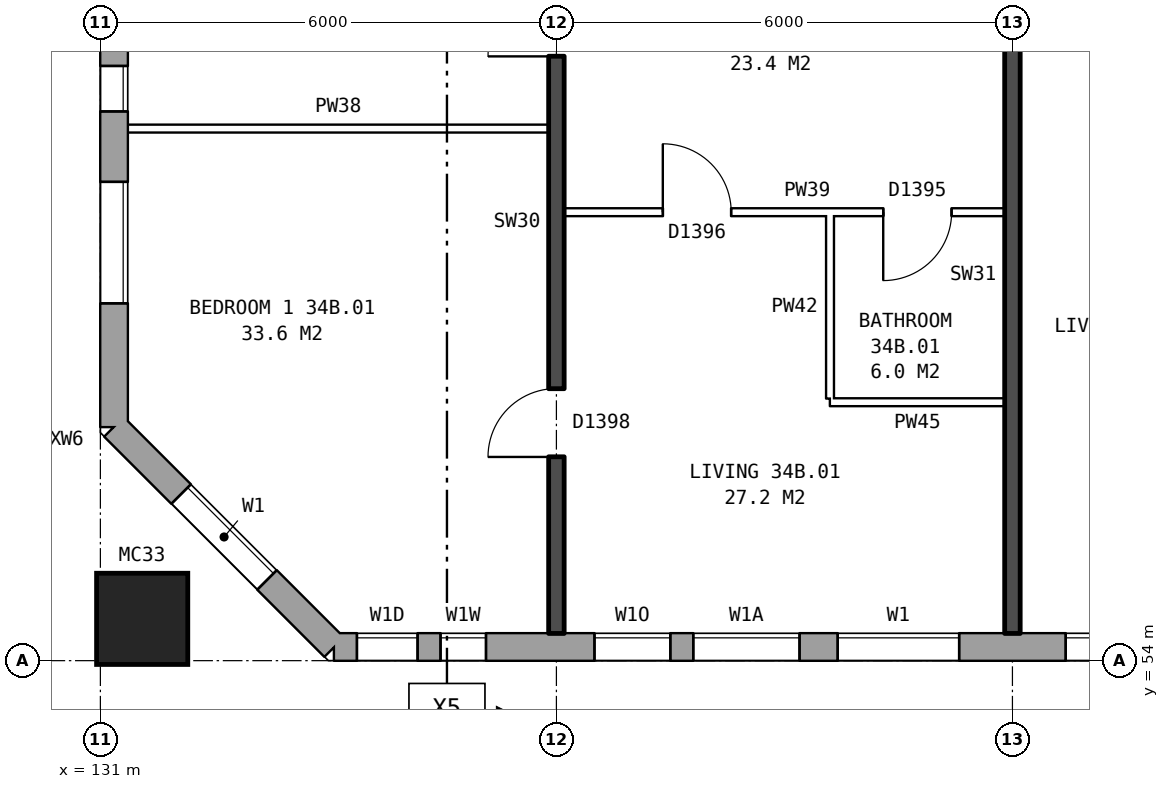
"""IFC4 building model, lengths in metres.
Left out: names, types, materials, properties, quantities, classifications, styles, units other than length and angle.
Written with IfcOpenShell. Run it as: python <this file> out.ifc"""

import sys

from ifc_helpers import new_model, si_unit, direction, frame, frame_2d, origin, origin_2d, place, context, subcontext, project, spatial, rectangle, hollow_rectangle, extrude, element, fill, save


model = new_model("IFC4")
c1 = context("Model", 3, precision=1e-05, world=origin(), true_north=direction((0.0, 1.0)))
c2 = subcontext(c1, "Body", "Model", "MODEL_VIEW")
j1 = project(units=[si_unit("LENGTHUNIT", "METRE"), si_unit("PLANEANGLEUNIT", "RADIAN")], contexts=[c1])
p1 = place(None, origin())
s1 = spatial("IfcSite", under=j1, at=p1, CompositionType="ELEMENT")
p2 = place(p1, origin())
s2 = spatial("IfcBuilding", under=s1, at=p2, CompositionType="ELEMENT")
p3 = place(p2, frame((0.0, 0.0, 123.7)))
s3 = spatial("IfcBuildingStorey", under=s2, at=p3, CompositionType="ELEMENT", Elevation=123.7)
p4 = place(p3, frame((131.55, 54.55, 0.0), z_axis=(0.0, 0.0, 1.0), x_axis=(1.0, 0.0, 0.0)))
e1 = element("IfcColumn", 1, at=p4, inside=s3, PredefinedType="COLUMN", context=c2, shape_type="SweptSolid", body=[
    extrude(hollow_rectangle(XDim=1.2, YDim=1.2, WallThickness=0.065, at=origin_2d()), origin(), (0.0, 0.0, 1.0), 3.1),
])
p5 = place(p3, frame((131.18, 57.075, 0.0), z_axis=(0.0, 0.0, 1.0), x_axis=(0.707106781187, -0.707106781187, 0.0)))
e2 = element("IfcWall", 2, at=p5, inside=s3, PredefinedType="STANDARD", context=c2, shape_type="SweptSolid", body=[
    extrude(rectangle(XDim=4.094, YDim=0.36, at=frame_2d((2.047, 0.0))), origin(), (0.0, 0.0, 1.0), 2.85),
])
p6 = place(p5, frame((1.247, 0.0, 0.8)))
e3 = element("IfcOpeningElement", 3, at=p6, cuts=e2, PredefinedType="OPENING", context=c2, shape_type="SweptSolid", body=[
    extrude(rectangle(XDim=1.6, YDim=1.8, at=frame_2d((0.8, 0.9))), frame((0.0, 0.19, 0.0), z_axis=(0.0, -1.0, 0.0), x_axis=(1.0, 0.0, 0.0)), (0.0, 0.0, 1.0), 0.38),
])
p7 = place(p3, frame((134.075, 54.18, 0.0), z_axis=(0.0, 0.0, 1.0), x_axis=(1.0, 0.0, 0.0)))
e4 = element("IfcWall", 4, at=p7, inside=s3, PredefinedType="STANDARD", context=c2, shape_type="SweptSolid", body=[
    extrude(rectangle(XDim=35.601, YDim=0.36, at=frame_2d((17.8, 0.0))), origin(), (0.0, 0.0, 1.0), 2.85),
])
p8 = place(p7, frame((0.3, 0.0, 0.8)))
e5 = element("IfcOpeningElement", 5, at=p8, cuts=e4, PredefinedType="OPENING", context=c2, shape_type="SweptSolid", body=[
    extrude(rectangle(XDim=0.8, YDim=1.8, at=frame_2d((0.4, 0.9))), frame((0.0, 0.19, 0.0), z_axis=(0.0, -1.0, 0.0), x_axis=(1.0, 0.0, 0.0)), (0.0, 0.0, 1.0), 0.38),
])
p9 = place(p7, frame((3.425, 0.0, 0.8)))
e6 = element("IfcOpeningElement", 6, at=p9, cuts=e4, PredefinedType="OPENING", context=c2, shape_type="SweptSolid", body=[
    extrude(rectangle(XDim=1.0, YDim=1.2, at=frame_2d((0.5, 0.6))), frame((0.0, 0.19, 0.0), z_axis=(0.0, -1.0, 0.0), x_axis=(1.0, 0.0, 0.0)), (0.0, 0.0, 1.0), 0.38),
])
p10 = place(p7, frame((6.625, 0.0, 0.8)))
e7 = element("IfcOpeningElement", 7, at=p10, cuts=e4, PredefinedType="OPENING", context=c2, shape_type="SweptSolid", body=[
    extrude(rectangle(XDim=1.6, YDim=1.8, at=frame_2d((0.8, 0.9))), frame((0.0, 0.19, 0.0), z_axis=(0.0, -1.0, 0.0), x_axis=(1.0, 0.0, 0.0)), (0.0, 0.0, 1.0), 0.38),
])
p11 = place(p7, frame((9.625, 0.0, 0.8)))
e8 = element("IfcOpeningElement", 8, at=p11, cuts=e4, PredefinedType="OPENING", context=c2, shape_type="SweptSolid", body=[
    extrude(rectangle(XDim=1.6, YDim=1.8, at=frame_2d((0.8, 0.9))), frame((0.0, 0.19, 0.0), z_axis=(0.0, -1.0, 0.0), x_axis=(1.0, 0.0, 0.0)), (0.0, 0.0, 1.0), 0.38),
])
p12 = place(p7, frame((12.625, 0.0, 0.8)))
e9 = element("IfcOpeningElement", 9, at=p12, cuts=e4, PredefinedType="OPENING", context=c2, shape_type="SweptSolid", body=[
    extrude(rectangle(XDim=1.6, YDim=1.8, at=frame_2d((0.8, 0.9))), frame((0.0, 0.19, 0.0), z_axis=(0.0, -1.0, 0.0), x_axis=(1.0, 0.0, 0.0)), (0.0, 0.0, 1.0), 0.38),
])
p13 = place(p7, frame((15.625, 0.0, 0.8)))
e10 = element("IfcOpeningElement", 10, at=p13, cuts=e4, PredefinedType="OPENING", context=c2, shape_type="SweptSolid", body=[
    extrude(rectangle(XDim=1.6, YDim=1.8, at=frame_2d((0.8, 0.9))), frame((0.0, 0.19, 0.0), z_axis=(0.0, -1.0, 0.0), x_axis=(1.0, 0.0, 0.0)), (0.0, 0.0, 1.0), 0.38),
])
p14 = place(p7, frame((18.625, 0.0, 0.8)))
e11 = element("IfcOpeningElement", 11, at=p14, cuts=e4, PredefinedType="OPENING", context=c2, shape_type="SweptSolid", body=[
    extrude(rectangle(XDim=1.6, YDim=1.8, at=frame_2d((0.8, 0.9))), frame((0.0, 0.19, 0.0), z_axis=(0.0, -1.0, 0.0), x_axis=(1.0, 0.0, 0.0)), (0.0, 0.0, 1.0), 0.38),
])
p15 = place(p7, frame((21.625, 0.0, 0.8)))
e12 = element("IfcOpeningElement", 12, at=p15, cuts=e4, PredefinedType="OPENING", context=c2, shape_type="SweptSolid", body=[
    extrude(rectangle(XDim=1.6, YDim=1.8, at=frame_2d((0.8, 0.9))), frame((0.0, 0.19, 0.0), z_axis=(0.0, -1.0, 0.0), x_axis=(1.0, 0.0, 0.0)), (0.0, 0.0, 1.0), 0.38),
])
p16 = place(p7, frame((24.625, 0.0, 0.8)))
e13 = element("IfcOpeningElement", 13, at=p16, cuts=e4, PredefinedType="OPENING", context=c2, shape_type="SweptSolid", body=[
    extrude(rectangle(XDim=1.6, YDim=1.8, at=frame_2d((0.8, 0.9))), frame((0.0, 0.19, 0.0), z_axis=(0.0, -1.0, 0.0), x_axis=(1.0, 0.0, 0.0)), (0.0, 0.0, 1.0), 0.38),
])
p17 = place(p7, frame((27.625, 0.0, 0.8)))
e14 = element("IfcOpeningElement", 14, at=p17, cuts=e4, PredefinedType="OPENING", context=c2, shape_type="SweptSolid", body=[
    extrude(rectangle(XDim=1.6, YDim=1.8, at=frame_2d((0.8, 0.9))), frame((0.0, 0.19, 0.0), z_axis=(0.0, -1.0, 0.0), x_axis=(1.0, 0.0, 0.0)), (0.0, 0.0, 1.0), 0.38),
])
p18 = place(p7, frame((29.525, 0.0, 0.8)))
e15 = element("IfcOpeningElement", 15, at=p18, cuts=e4, PredefinedType="OPENING", context=c2, shape_type="SweptSolid", body=[
    extrude(rectangle(XDim=1.6, YDim=1.8, at=frame_2d((0.8, 0.9))), frame((0.0, 0.19, 0.0), z_axis=(0.0, -1.0, 0.0), x_axis=(1.0, 0.0, 0.0)), (0.0, 0.0, 1.0), 0.38),
])
p19 = place(p7, frame((33.525, 0.0, 1.7)))
e16 = element("IfcOpeningElement", 16, at=p19, cuts=e4, PredefinedType="OPENING", context=c2, shape_type="SweptSolid", body=[
    extrude(rectangle(XDim=0.6, YDim=0.9, at=frame_2d((0.3, 0.45))), frame((0.0, 0.19, 0.0), z_axis=(0.0, -1.0, 0.0), x_axis=(1.0, 0.0, 0.0)), (0.0, 0.0, 1.0), 0.38),
])
p20 = place(p7, frame((1.4, 0.0, 1.6)))
e17 = element("IfcOpeningElement", 17, at=p20, cuts=e4, PredefinedType="OPENING", context=c2, shape_type="SweptSolid", body=[
    extrude(rectangle(XDim=0.6, YDim=0.9, at=frame_2d((0.3, 0.45))), frame((0.0, 0.19, 0.0), z_axis=(0.0, -1.0, 0.0), x_axis=(1.0, 0.0, 0.0)), (0.0, 0.0, 1.0), 0.38),
])
p21 = place(p7, frame((4.725, 0.0, 0.8)))
e18 = element("IfcOpeningElement", 18, at=p21, cuts=e4, PredefinedType="OPENING", context=c2, shape_type="SweptSolid", body=[
    extrude(rectangle(XDim=1.4, YDim=1.8, at=frame_2d((0.7, 0.9))), frame((0.0, 0.19, 0.0), z_axis=(0.0, -1.0, 0.0), x_axis=(1.0, 0.0, 0.0)), (0.0, 0.0, 1.0), 0.38),
])
p22 = place(p7, frame((31.425, 0.0, 0.8)))
e19 = element("IfcOpeningElement", 19, at=p22, cuts=e4, PredefinedType="OPENING", context=c2, shape_type="SweptSolid", body=[
    extrude(rectangle(XDim=0.6, YDim=1.2, at=frame_2d((0.3, 0.6))), frame((0.0, 0.19, 0.0), z_axis=(0.0, -1.0, 0.0), x_axis=(1.0, 0.0, 0.0)), (0.0, 0.0, 1.0), 0.38),
])
p23 = place(p7, frame((34.425, 0.0, 0.8)))
e20 = element("IfcOpeningElement", 20, at=p23, cuts=e4, PredefinedType="OPENING", context=c2, shape_type="SweptSolid", body=[
    extrude(rectangle(XDim=0.8, YDim=1.8, at=frame_2d((0.4, 0.9))), frame((0.0, 0.19, 0.0), z_axis=(0.0, -1.0, 0.0), x_axis=(1.0, 0.0, 0.0)), (0.0, 0.0, 1.0), 0.38),
])
p24 = place(p3, frame((131.18, 82.925, 0.0), z_axis=(0.0, 0.0, 1.0), x_axis=(0.0, -1.0, 0.0)))
e21 = element("IfcWall", 21, at=p24, inside=s3, PredefinedType="STANDARD", context=c2, shape_type="SweptSolid", body=[
    extrude(rectangle(XDim=25.851, YDim=0.36, at=frame_2d((12.925, 0.0))), origin(), (0.0, 0.0, 1.0), 2.85),
])
p25 = place(p24, frame((1.625, 0.0, 0.8)))
e22 = element("IfcOpeningElement", 22, at=p25, cuts=e21, PredefinedType="OPENING", context=c2, shape_type="SweptSolid", body=[
    extrude(rectangle(XDim=1.6, YDim=1.8, at=frame_2d((0.8, 0.9))), frame((0.0, 0.19, 0.0), z_axis=(0.0, -1.0, 0.0), x_axis=(1.0, 0.0, 0.0)), (0.0, 0.0, 1.0), 0.38),
])
p26 = place(p24, frame((4.075, 0.0, 1.65)))
e23 = element("IfcOpeningElement", 23, at=p26, cuts=e21, PredefinedType="OPENING", context=c2, shape_type="SweptSolid", body=[
    extrude(rectangle(XDim=0.6, YDim=0.9, at=frame_2d((0.3, 0.45))), frame((0.0, 0.19, 0.0), z_axis=(0.0, -1.0, 0.0), x_axis=(1.0, 0.0, 0.0)), (0.0, 0.0, 1.0), 0.38),
])
p27 = place(p24, frame((19.5, 0.0, 0.35)))
e24 = element("IfcOpeningElement", 24, at=p27, cuts=e21, PredefinedType="OPENING", context=c2, shape_type="SweptSolid", body=[
    extrude(rectangle(XDim=1.2, YDim=0.9, at=frame_2d((0.6, 0.45))), frame((0.0, 0.19, 0.0), z_axis=(0.0, -1.0, 0.0), x_axis=(1.0, 0.0, 0.0)), (0.0, 0.0, 1.0), 0.38),
])
p28 = place(p24, frame((22.625, 0.0, 0.8)))
e25 = element("IfcOpeningElement", 25, at=p28, cuts=e21, PredefinedType="OPENING", context=c2, shape_type="SweptSolid", body=[
    extrude(rectangle(XDim=1.6, YDim=1.8, at=frame_2d((0.8, 0.9))), frame((0.0, 0.19, 0.0), z_axis=(0.0, -1.0, 0.0), x_axis=(1.0, 0.0, 0.0)), (0.0, 0.0, 1.0), 0.38),
])
p29 = place(p24, frame((5.125, 0.0, 0.35)))
e26 = element("IfcOpeningElement", 26, at=p29, cuts=e21, PredefinedType="OPENING", context=c2, shape_type="SweptSolid", body=[
    extrude(rectangle(XDim=1.2, YDim=0.9, at=frame_2d((0.6, 0.45))), frame((0.0, 0.19, 0.0), z_axis=(0.0, -1.0, 0.0), x_axis=(1.0, 0.0, 0.0)), (0.0, 0.0, 1.0), 0.38),
])
p30 = place(p24, frame((21.1, 0.0, 1.65)))
e27 = element("IfcOpeningElement", 27, at=p30, cuts=e21, PredefinedType="OPENING", context=c2, shape_type="SweptSolid", body=[
    extrude(rectangle(XDim=0.6, YDim=0.9, at=frame_2d((0.3, 0.45))), frame((0.0, 0.19, 0.0), z_axis=(0.0, -1.0, 0.0), x_axis=(1.0, 0.0, 0.0)), (0.0, 0.0, 1.0), 0.38),
])
p31 = place(p3, frame((140.6, 57.4, 0.0), z_axis=(0.0, 0.0, 1.0), x_axis=(1.0, 0.0, 0.0)))
e28 = element("IfcWall", 28, at=p31, inside=s3, PredefinedType="PARTITIONING", context=c2, shape_type="SweptSolid", body=[
    extrude(rectangle(XDim=2.3, YDim=0.1, at=frame_2d((1.15, 0.0))), origin(), (0.0, 0.0, 1.0), 2.85),
])
p32 = place(p3, frame((137.1, 59.9, 0.0), z_axis=(0.0, 0.0, 1.0), x_axis=(1.0, 0.0, 0.0)))
e29 = element("IfcWall", 29, at=p32, inside=s3, PredefinedType="PARTITIONING", context=c2, shape_type="SweptSolid", body=[
    extrude(rectangle(XDim=5.8, YDim=0.1, at=frame_2d((2.9, 0.0))), origin(), (0.0, 0.0, 1.0), 2.85),
])
p33 = place(p32, frame((1.3, 0.0, 0.0)))
e30 = element("IfcOpeningElement", 30, at=p33, cuts=e29, PredefinedType="OPENING", context=c2, shape_type="SweptSolid", body=[
    extrude(rectangle(XDim=0.9, YDim=2.1, at=frame_2d((0.45, 1.05))), frame((0.0, 0.06, 0.0), z_axis=(0.0, -1.0, 0.0), x_axis=(1.0, 0.0, 0.0)), (0.0, 0.0, 1.0), 0.12),
])
p34 = place(p32, frame((4.2, 0.0, 0.0)))
e31 = element("IfcOpeningElement", 31, at=p34, cuts=e29, PredefinedType="OPENING", context=c2, shape_type="SweptSolid", body=[
    extrude(rectangle(XDim=0.9, YDim=2.1, at=frame_2d((0.45, 1.05))), frame((0.0, 0.06, 0.0), z_axis=(0.0, -1.0, 0.0), x_axis=(1.0, 0.0, 0.0)), (0.0, 0.0, 1.0), 0.12),
])
p35 = place(p3, frame((131.36, 61.0, 0.0), z_axis=(0.0, 0.0, 1.0), x_axis=(1.0, 0.0, 0.0)))
e32 = element("IfcWall", 32, at=p35, inside=s3, PredefinedType="PARTITIONING", context=c2, shape_type="SweptSolid", body=[
    extrude(rectangle(XDim=5.54, YDim=0.1, at=frame_2d((2.77, 0.0))), origin(), (0.0, 0.0, 1.0), 2.85),
])
p36 = place(p3, frame((137.0, 54.36, 0.0), z_axis=(0.0, 0.0, 1.0), x_axis=(0.0, 1.0, 0.0)))
e33 = element("IfcWall", 33, at=p36, inside=s3, PredefinedType="SOLIDWALL", context=c2, shape_type="SweptSolid", body=[
    extrude(rectangle(XDim=9.44, YDim=0.2, at=frame_2d((4.72, 0.0))), origin(), (0.0, 0.0, 1.0), 2.85),
])
p37 = place(p36, frame((2.32, 0.0, 0.0)))
e34 = element("IfcOpeningElement", 34, at=p37, cuts=e33, PredefinedType="OPENING", context=c2, shape_type="SweptSolid", body=[
    extrude(rectangle(XDim=0.9, YDim=2.1, at=frame_2d((0.45, 1.05))), frame((0.0, 0.11, 0.0), z_axis=(0.0, -1.0, 0.0), x_axis=(1.0, 0.0, 0.0)), (0.0, 0.0, 1.0), 0.22),
])
p38 = place(p36, frame((7.59, 0.0, 0.0)))
e35 = element("IfcOpeningElement", 35, at=p38, cuts=e33, PredefinedType="OPENING", context=c2, shape_type="SweptSolid", body=[
    extrude(rectangle(XDim=0.9, YDim=2.1, at=frame_2d((0.45, 1.05))), frame((0.0, 0.11, 0.0), z_axis=(0.0, -1.0, 0.0), x_axis=(1.0, 0.0, 0.0)), (0.0, 0.0, 1.0), 0.22),
])
p39 = place(p3, frame((140.6, 57.45, 0.0), z_axis=(0.0, 0.0, 1.0), x_axis=(0.0, 1.0, 0.0)))
e36 = element("IfcWall", 36, at=p39, inside=s3, PredefinedType="PARTITIONING", context=c2, shape_type="SweptSolid", body=[
    extrude(rectangle(XDim=2.4, YDim=0.1, at=frame_2d((1.2, 0.0))), origin(), (0.0, 0.0, 1.0), 2.85),
])
p40 = place(p3, frame((143.0, 54.36, 0.0), z_axis=(0.0, 0.0, 1.0), x_axis=(0.0, 1.0, 0.0)))
e37 = element("IfcWall", 37, at=p40, inside=s3, PredefinedType="SOLIDWALL", context=c2, shape_type="SweptSolid", body=[
    extrude(rectangle(XDim=9.44, YDim=0.2, at=frame_2d((4.72, 0.0))), origin(), (0.0, 0.0, 1.0), 2.85),
])
p41 = place(p6, origin())
e38 = element("IfcWindow", 38, at=p41, inside=s3, PartitioningType="SINGLE_PANEL", PredefinedType="WINDOW", context=c2, shape_type="SweptSolid", body=[
    extrude(rectangle(XDim=1.6, YDim=1.8, at=frame_2d((0.8, 0.9))), frame((0.0, 0.15, 0.0), z_axis=(0.0, -1.0, 0.0), x_axis=(1.0, 0.0, 0.0)), (0.0, 0.0, 1.0), 0.06),
])
fill(e3, e38)
p42 = place(p8, origin())
e39 = element("IfcWindow", 39, at=p42, inside=s3, PartitioningType="SINGLE_PANEL", PredefinedType="WINDOW", context=c2, shape_type="SweptSolid", body=[
    extrude(rectangle(XDim=0.8, YDim=1.8, at=frame_2d((0.4, 0.9))), frame((0.0, 0.15, 0.0), z_axis=(0.0, -1.0, 0.0), x_axis=(1.0, 0.0, 0.0)), (0.0, 0.0, 1.0), 0.06),
])
fill(e5, e39)
p43 = place(p9, origin())
e40 = element("IfcWindow", 40, at=p43, inside=s3, PartitioningType="SINGLE_PANEL", PredefinedType="WINDOW", context=c2, shape_type="SweptSolid", body=[
    extrude(rectangle(XDim=1.0, YDim=1.2, at=frame_2d((0.5, 0.6))), frame((0.0, 0.15, 0.0), z_axis=(0.0, -1.0, 0.0), x_axis=(1.0, 0.0, 0.0)), (0.0, 0.0, 1.0), 0.06),
])
fill(e6, e40)
p44 = place(p10, origin())
e41 = element("IfcWindow", 41, at=p44, inside=s3, PartitioningType="SINGLE_PANEL", PredefinedType="WINDOW", context=c2, shape_type="SweptSolid", body=[
    extrude(rectangle(XDim=1.6, YDim=1.8, at=frame_2d((0.8, 0.9))), frame((0.0, 0.15, 0.0), z_axis=(0.0, -1.0, 0.0), x_axis=(1.0, 0.0, 0.0)), (0.0, 0.0, 1.0), 0.06),
])
fill(e7, e41)
p45 = place(p11, origin())
e42 = element("IfcWindow", 42, at=p45, inside=s3, PartitioningType="SINGLE_PANEL", PredefinedType="WINDOW", context=c2, shape_type="SweptSolid", body=[
    extrude(rectangle(XDim=1.6, YDim=1.8, at=frame_2d((0.8, 0.9))), frame((0.0, 0.15, 0.0), z_axis=(0.0, -1.0, 0.0), x_axis=(1.0, 0.0, 0.0)), (0.0, 0.0, 1.0), 0.06),
])
fill(e8, e42)
p46 = place(p28, origin())
e43 = element("IfcWindow", 43, at=p46, inside=s3, PartitioningType="SINGLE_PANEL", PredefinedType="WINDOW", context=c2, shape_type="SweptSolid", body=[
    extrude(rectangle(XDim=1.6, YDim=1.8, at=frame_2d((0.8, 0.9))), frame((0.0, 0.15, 0.0), z_axis=(0.0, -1.0, 0.0), x_axis=(1.0, 0.0, 0.0)), (0.0, 0.0, 1.0), 0.06),
])
fill(e25, e43)
p47 = place(p37, origin())
e44 = element("IfcDoor", 44, at=p47, inside=s3, OperationType="SINGLE_SWING_LEFT", PredefinedType="DOOR", context=c2, shape_type="SweptSolid", body=[
    extrude(rectangle(XDim=0.9, YDim=2.1, at=frame_2d((0.45, 1.05))), frame((0.0, 0.025, 0.0), z_axis=(0.0, -1.0, 0.0), x_axis=(1.0, 0.0, 0.0)), (0.0, 0.0, 1.0), 0.05),
])
fill(e34, e44)
p48 = place(p38, origin())
e45 = element("IfcDoor", 45, at=p48, inside=s3, OperationType="SINGLE_SWING_LEFT", PredefinedType="DOOR", context=c2, shape_type="SweptSolid", body=[
    extrude(rectangle(XDim=0.9, YDim=2.1, at=frame_2d((0.45, 1.05))), frame((0.0, 0.025, 0.0), z_axis=(0.0, -1.0, 0.0), x_axis=(1.0, 0.0, 0.0)), (0.0, 0.0, 1.0), 0.05),
])
fill(e35, e45)
p49 = place(p33, origin())
e46 = element("IfcDoor", 46, at=p49, inside=s3, OperationType="SINGLE_SWING_LEFT", PredefinedType="DOOR", context=c2, shape_type="SweptSolid", body=[
    extrude(rectangle(XDim=0.9, YDim=2.1, at=frame_2d((0.45, 1.05))), frame((0.0, 0.025, 0.0), z_axis=(0.0, -1.0, 0.0), x_axis=(1.0, 0.0, 0.0)), (0.0, 0.0, 1.0), 0.05),
])
fill(e30, e46)
p50 = place(p34, frame((0.9, 0.0, 0.0), z_axis=(0.0, 0.0, 1.0), x_axis=(-1.0, 0.0, 0.0)))
e47 = element("IfcDoor", 47, at=p50, inside=s3, OperationType="SINGLE_SWING_RIGHT", PredefinedType="DOOR", context=c2, shape_type="SweptSolid", body=[
    extrude(rectangle(XDim=0.9, YDim=2.1, at=frame_2d((0.45, 1.05))), frame((0.0, 0.025, 0.0), z_axis=(0.0, -1.0, 0.0), x_axis=(1.0, 0.0, 0.0)), (0.0, 0.0, 1.0), 0.05),
])
fill(e31, e47)
p51 = place(p20, origin())
e48 = element("IfcWindow", 48, at=p51, inside=s3, PartitioningType="SINGLE_PANEL", PredefinedType="WINDOW", context=c2, shape_type="SweptSolid", body=[
    extrude(rectangle(XDim=0.6, YDim=0.9, at=frame_2d((0.3, 0.45))), frame((0.0, 0.15, 0.0), z_axis=(0.0, -1.0, 0.0), x_axis=(1.0, 0.0, 0.0)), (0.0, 0.0, 1.0), 0.06),
])
fill(e17, e48)
p52 = place(p21, origin())
e49 = element("IfcWindow", 49, at=p52, inside=s3, PartitioningType="SINGLE_PANEL", PredefinedType="WINDOW", context=c2, shape_type="SweptSolid", body=[
    extrude(rectangle(XDim=1.4, YDim=1.8, at=frame_2d((0.7, 0.9))), frame((0.0, 0.15, 0.0), z_axis=(0.0, -1.0, 0.0), x_axis=(1.0, 0.0, 0.0)), (0.0, 0.0, 1.0), 0.06),
])
fill(e18, e49)
p53 = place(p30, origin())
e50 = element("IfcWindow", 50, at=p53, inside=s3, PartitioningType="SINGLE_PANEL", PredefinedType="WINDOW", context=c2, shape_type="SweptSolid", body=[
    extrude(rectangle(XDim=0.6, YDim=0.9, at=frame_2d((0.3, 0.45))), frame((0.0, 0.15, 0.0), z_axis=(0.0, -1.0, 0.0), x_axis=(1.0, 0.0, 0.0)), (0.0, 0.0, 1.0), 0.06),
])
fill(e27, e50)
save(model, sys.argv[1])
